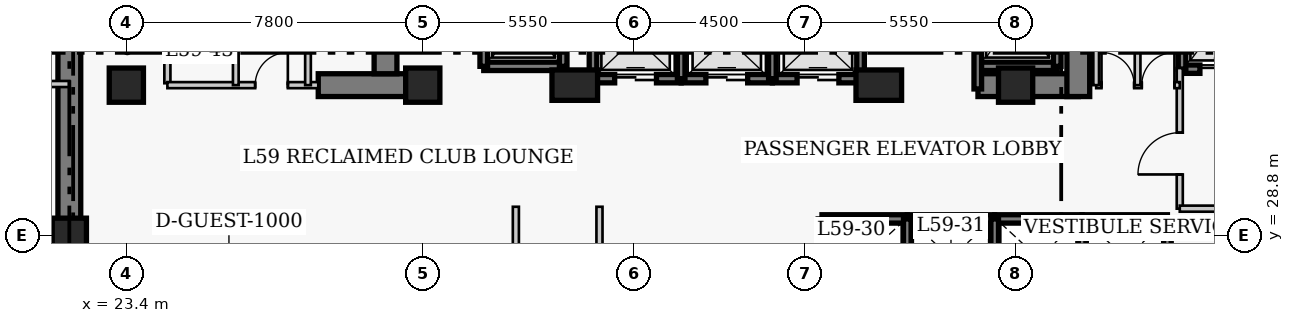
"""IFC4 building model, lengths in metres.
Left out: names, types, materials, properties, quantities, classifications, styles, units other than length and angle.
Written with IfcOpenShell. Run it as: python <this file> out.ifc"""

import sys

from ifc_helpers import new_model, si_unit, direction, frame, frame_2d, origin, origin_2d, place, context, subcontext, project, spatial, rectangle, extrude, element, fill, save


model = new_model("IFC4")
c1 = context("Model", 3, precision=1e-05, world=origin(), true_north=direction((0.0, 1.0)))
c2 = subcontext(c1, "Body", "Model", "MODEL_VIEW")
j1 = project(units=[si_unit("LENGTHUNIT", "METRE"), si_unit("PLANEANGLEUNIT", "RADIAN")], contexts=[c1])
p1 = place(None, origin())
s1 = spatial("IfcSite", under=j1, at=p1, CompositionType="ELEMENT")
p2 = place(p1, origin())
s2 = spatial("IfcBuilding", under=s1, at=p2, CompositionType="ELEMENT")
p3 = place(p2, frame((0.0, 0.0, 236.5)))
s3 = spatial("IfcBuildingStorey", under=s2, at=p3, CompositionType="ELEMENT", Elevation=236.5)
p4 = place(p3, frame((21.9, 27.05, 0.0), z_axis=(0.0, 0.0, 1.0), x_axis=(0.0, 1.0, 0.0)))
e1 = element("IfcWall", 1, at=p4, inside=s3, PredefinedType="SHEAR", context=c2, shape_type="SweptSolid", body=[
    extrude(rectangle(XDim=13.57, YDim=0.6, at=frame_2d((6.785, 0.0))), origin(), (0.0, 0.0, 1.0), 3.9),
])
p5 = place(p3, frame((28.45, 32.75, 0.0), z_axis=(0.0, 0.0, 1.0), x_axis=(1.0, 0.0, 0.0)))
e2 = element("IfcWall", 2, at=p5, inside=s3, PredefinedType="SHEAR", context=c2, shape_type="SweptSolid", body=[
    extrude(rectangle(XDim=2.4, YDim=0.6, at=frame_2d((1.2, 0.0))), origin(), (0.0, 0.0, 1.0), 3.9),
])
p6 = place(p3, frame((45.81, 32.75, 0.0), z_axis=(0.0, 0.0, 1.0), x_axis=(1.0, 0.0, 0.0)))
e3 = element("IfcWall", 3, at=p6, inside=s3, PredefinedType="SHEAR", context=c2, shape_type="SweptSolid", body=[
    extrude(rectangle(XDim=2.64, YDim=0.6, at=frame_2d((1.32, 0.0))), origin(), (0.0, 0.0, 1.0), 3.9),
])
p7 = place(p3, frame((30.22, 33.05, 0.0), z_axis=(0.0, 0.0, 1.0), x_axis=(0.0, 1.0, 0.0)))
e4 = element("IfcWall", 4, at=p7, inside=s3, PredefinedType="SHEAR", context=c2, shape_type="SweptSolid", body=[
    extrude(rectangle(XDim=7.27, YDim=0.6, at=frame_2d((3.635, 0.0))), origin(), (0.0, 0.0, 1.0), 3.9),
])
p8 = place(p3, frame((48.45, 32.45, 0.0), z_axis=(0.0, 0.0, 1.0), x_axis=(0.0, 1.0, 0.0)))
e5 = element("IfcWall", 5, at=p8, inside=s3, PredefinedType="SHEAR", context=c2, shape_type="SweptSolid", body=[
    extrude(rectangle(XDim=7.87, YDim=0.6, at=frame_2d((3.935, 0.0))), origin(), (0.0, 0.0, 1.0), 3.9),
])
p9 = place(p8, frame((5.75, 0.0, 0.0)))
e6 = element("IfcOpeningElement", 6, at=p9, cuts=e5, PredefinedType="OPENING", context=c2, shape_type="SweptSolid", body=[
    extrude(rectangle(XDim=1.1, YDim=2.15, at=frame_2d((0.55, 1.075))), frame((0.0, 0.31, 0.0), z_axis=(0.0, -1.0, 0.0), x_axis=(1.0, 0.0, 0.0)), (0.0, 0.0, 1.0), 0.62),
])
for number, where, z_axis, x_axis in (
    (7, (21.9, 28.8, 0.0), (0.0, 0.0, 1.0), (1.0, 0.0, 0.0)),
    (8, (23.4, 32.75, 0.0), (0.0, 0.0, 1.0), (1.0, 0.0, 0.0)),
    (9, (31.2, 32.75, 0.0), (0.0, 0.0, 1.0), (1.0, 0.0, 0.0)),
):
    element("IfcColumn", number, at=place(p3, frame(where, z_axis=z_axis, x_axis=x_axis)), inside=s3, PredefinedType="COLUMN", context=c2, shape_type="SweptSolid", body=[
        extrude(rectangle(XDim=0.9, YDim=0.9, at=origin_2d()), origin(), (0.0, 0.0, 1.0), 3.9),
    ])
for number, where, z_axis, x_axis in (
    (10, (35.2, 32.75, 0.0), (0.0, 0.0, 1.0), (1.0, 0.0, 0.0)),
    (11, (43.2, 32.75, 0.0), (0.0, 0.0, 1.0), (1.0, 0.0, 0.0)),
):
    element("IfcColumn", number, at=place(p3, frame(where, z_axis=z_axis, x_axis=x_axis)), inside=s3, PredefinedType="COLUMN", context=c2, shape_type="SweptSolid", body=[
        extrude(rectangle(XDim=1.2, YDim=0.8, at=origin_2d()), origin(), (0.0, 0.0, 1.0), 3.9),
    ])
p10 = place(p3, frame((46.8, 32.75, 0.0), z_axis=(0.0, 0.0, 1.0), x_axis=(1.0, 0.0, 0.0)))
e12 = element("IfcColumn", 12, at=p10, inside=s3, PredefinedType="COLUMN", context=c2, shape_type="SweptSolid", body=[
    extrude(rectangle(XDim=0.9, YDim=0.9, at=origin_2d()), origin(), (0.0, 0.0, 1.0), 3.9),
])
p11 = place(p3, frame((41.705, 29.23, 0.0), z_axis=(0.0, 0.0, 1.0), x_axis=(1.0, 0.0, 0.0)))
e13 = element("IfcWall", 13, at=p11, inside=s3, PredefinedType="SHEAR", context=c2, shape_type="SweptSolid", body=[
    extrude(rectangle(XDim=2.245, YDim=0.22, at=frame_2d((1.123, 0.0))), origin(), (0.0, 0.0, 1.0), 3.9),
])
p12 = place(p3, frame((41.705, 27.17, 0.0), z_axis=(0.0, 0.0, 1.0), x_axis=(0.0, 1.0, 0.0)))
e14 = element("IfcWall", 14, at=p12, inside=s3, PredefinedType="SHEAR", context=c2, shape_type="SweptSolid", body=[
    extrude(rectangle(XDim=2.06, YDim=0.2, at=frame_2d((1.03, 0.0))), origin(), (0.0, 0.0, 1.0), 3.9),
])
p13 = place(p3, frame((43.95, 29.23, 0.0), z_axis=(0.0, 0.0, 1.0), x_axis=(1.0, 0.0, 0.0)))
e15 = element("IfcWall", 15, at=p13, inside=s3, PredefinedType="SHEAR", context=c2, shape_type="SweptSolid", body=[
    extrude(rectangle(XDim=2.3, YDim=0.22, at=frame_2d((1.15, 0.0))), origin(), (0.0, 0.0, 1.0), 3.9),
])
p14 = place(p3, frame((43.95, 27.17, 0.0), z_axis=(0.0, 0.0, 1.0), x_axis=(0.0, 1.0, 0.0)))
e16 = element("IfcWall", 16, at=p14, inside=s3, PredefinedType="SHEAR", context=c2, shape_type="SweptSolid", body=[
    extrude(rectangle(XDim=2.06, YDim=0.2, at=frame_2d((1.03, 0.0))), origin(), (0.0, 0.0, 1.0), 3.9),
])
p15 = place(p3, frame((46.25, 29.23, 0.0), z_axis=(0.0, 0.0, 1.0), x_axis=(1.0, 0.0, 0.0)))
e17 = element("IfcWall", 17, at=p15, inside=s3, PredefinedType="SHEAR", context=c2, shape_type="SweptSolid", body=[
    extrude(rectangle(XDim=2.3, YDim=0.22, at=frame_2d((1.15, 0.0))), origin(), (0.0, 0.0, 1.0), 3.9),
])
p16 = place(p3, frame((46.25, 27.17, 0.0), z_axis=(0.0, 0.0, 1.0), x_axis=(0.0, 1.0, 0.0)))
e18 = element("IfcWall", 18, at=p16, inside=s3, PredefinedType="SHEAR", context=c2, shape_type="SweptSolid", body=[
    extrude(rectangle(XDim=2.06, YDim=0.2, at=frame_2d((1.03, 0.0))), origin(), (0.0, 0.0, 1.0), 3.9),
])
p17 = place(p3, frame((48.55, 29.23, 0.0), z_axis=(0.0, 0.0, 1.0), x_axis=(1.0, 0.0, 0.0)))
e19 = element("IfcWall", 19, at=p17, inside=s3, PredefinedType="SHEAR", context=c2, shape_type="SweptSolid", body=[
    extrude(rectangle(XDim=2.245, YDim=0.22, at=frame_2d((1.123, 0.0))), origin(), (0.0, 0.0, 1.0), 3.9),
])
for number, where, z_axis, x_axis in (
    (20, (48.55, 27.17, 0.0), (0.0, 0.0, 1.0), (0.0, 1.0, 0.0)),
    (21, (50.795, 27.17, 0.0), (0.0, 0.0, 1.0), (0.0, 1.0, 0.0)),
):
    element("IfcWall", number, at=place(p3, frame(where, z_axis=z_axis, x_axis=x_axis)), inside=s3, PredefinedType="SHEAR", context=c2, shape_type="SweptSolid", body=[
        extrude(rectangle(XDim=2.06, YDim=0.2, at=frame_2d((1.03, 0.0))), origin(), (0.0, 0.0, 1.0), 3.9),
    ])
p18 = place(p3, frame((35.68, 32.92, 0.0), z_axis=(0.0, 0.0, 1.0), x_axis=(1.0, 0.0, 0.0)))
e22 = element("IfcWall", 22, at=p18, inside=s3, PredefinedType="SHEAR", context=c2, shape_type="SweptSolid", body=[
    extrude(rectangle(XDim=2.32, YDim=0.22, at=frame_2d((1.16, 0.0))), origin(), (0.0, 0.0, 1.0), 3.9),
])
p19 = place(p18, frame((0.57, 0.0, 0.0)))
e23 = element("IfcOpeningElement", 23, at=p19, cuts=e22, PredefinedType="OPENING", context=c2, shape_type="SweptSolid", body=[
    extrude(rectangle(XDim=1.1, YDim=2.15, at=frame_2d((0.55, 1.075))), frame((0.0, 0.12, 0.0), z_axis=(0.0, -1.0, 0.0), x_axis=(1.0, 0.0, 0.0)), (0.0, 0.0, 1.0), 0.24),
])
p20 = place(p3, frame((35.68, 32.92, 0.0), z_axis=(0.0, 0.0, 1.0), x_axis=(0.0, 1.0, 0.0)))
e24 = element("IfcWall", 24, at=p20, inside=s3, PredefinedType="SHEAR", context=c2, shape_type="SweptSolid", body=[
    extrude(rectangle(XDim=2.16, YDim=0.2, at=frame_2d((1.08, 0.0))), origin(), (0.0, 0.0, 1.0), 3.9),
])
p21 = place(p3, frame((38.0, 32.92, 0.0), z_axis=(0.0, 0.0, 1.0), x_axis=(1.0, 0.0, 0.0)))
e25 = element("IfcWall", 25, at=p21, inside=s3, PredefinedType="SHEAR", context=c2, shape_type="SweptSolid", body=[
    extrude(rectangle(XDim=2.4, YDim=0.22, at=frame_2d((1.2, 0.0))), origin(), (0.0, 0.0, 1.0), 3.9),
])
p22 = place(p21, frame((0.65, 0.0, 0.0)))
e26 = element("IfcOpeningElement", 26, at=p22, cuts=e25, PredefinedType="OPENING", context=c2, shape_type="SweptSolid", body=[
    extrude(rectangle(XDim=1.1, YDim=2.15, at=frame_2d((0.55, 1.075))), frame((0.0, 0.12, 0.0), z_axis=(0.0, -1.0, 0.0), x_axis=(1.0, 0.0, 0.0)), (0.0, 0.0, 1.0), 0.24),
])
p23 = place(p3, frame((38.0, 32.92, 0.0), z_axis=(0.0, 0.0, 1.0), x_axis=(0.0, 1.0, 0.0)))
e27 = element("IfcWall", 27, at=p23, inside=s3, PredefinedType="SHEAR", context=c2, shape_type="SweptSolid", body=[
    extrude(rectangle(XDim=2.16, YDim=0.2, at=frame_2d((1.08, 0.0))), origin(), (0.0, 0.0, 1.0), 3.9),
])
p24 = place(p3, frame((40.4, 32.92, 0.0), z_axis=(0.0, 0.0, 1.0), x_axis=(1.0, 0.0, 0.0)))
e28 = element("IfcWall", 28, at=p24, inside=s3, PredefinedType="SHEAR", context=c2, shape_type="SweptSolid", body=[
    extrude(rectangle(XDim=2.32, YDim=0.22, at=frame_2d((1.16, 0.0))), origin(), (0.0, 0.0, 1.0), 3.9),
])
p25 = place(p24, frame((0.65, 0.0, 0.0)))
e29 = element("IfcOpeningElement", 29, at=p25, cuts=e28, PredefinedType="OPENING", context=c2, shape_type="SweptSolid", body=[
    extrude(rectangle(XDim=1.1, YDim=2.15, at=frame_2d((0.55, 1.075))), frame((0.0, 0.12, 0.0), z_axis=(0.0, -1.0, 0.0), x_axis=(1.0, 0.0, 0.0)), (0.0, 0.0, 1.0), 0.24),
])
for number, where, z_axis, x_axis in (
    (30, (40.4, 32.92, 0.0), (0.0, 0.0, 1.0), (0.0, 1.0, 0.0)),
    (31, (42.72, 32.92, 0.0), (0.0, 0.0, 1.0), (0.0, 1.0, 0.0)),
):
    element("IfcWall", number, at=place(p3, frame(where, z_axis=z_axis, x_axis=x_axis)), inside=s3, PredefinedType="SHEAR", context=c2, shape_type="SweptSolid", body=[
        extrude(rectangle(XDim=2.16, YDim=0.2, at=frame_2d((1.08, 0.0))), origin(), (0.0, 0.0, 1.0), 3.9),
    ])
p26 = place(p3, frame((51.18, 33.17, 0.0), z_axis=(0.0, 0.0, 1.0), x_axis=(1.0, 0.0, 0.0)))
e32 = element("IfcWall", 32, at=p26, inside=s3, PredefinedType="SHEAR", context=c2, shape_type="SweptSolid", body=[
    extrude(rectangle(XDim=2.42, YDim=0.22, at=frame_2d((1.21, 0.0))), origin(), (0.0, 0.0, 1.0), 3.9),
])
p27 = place(p26, frame((0.47, 0.0, 0.0)))
e33 = element("IfcOpeningElement", 33, at=p27, cuts=e32, PredefinedType="OPENING", context=c2, shape_type="SweptSolid", body=[
    extrude(rectangle(XDim=1.3, YDim=2.15, at=frame_2d((0.65, 1.075))), frame((0.0, 0.12, 0.0), z_axis=(0.0, -1.0, 0.0), x_axis=(1.0, 0.0, 0.0)), (0.0, 0.0, 1.0), 0.24),
])
p28 = place(p3, frame((51.18, 33.17, 0.0), z_axis=(0.0, 0.0, 1.0), x_axis=(0.0, 1.0, 0.0)))
e34 = element("IfcWall", 34, at=p28, inside=s3, PredefinedType="SHEAR", context=c2, shape_type="SweptSolid", body=[
    extrude(rectangle(XDim=2.86, YDim=0.2, at=frame_2d((1.43, 0.0))), origin(), (0.0, 0.0, 1.0), 3.9),
])
p29 = place(p3, frame((32.805, 33.245, 0.0), z_axis=(0.0, 0.0, 1.0), x_axis=(1.0, 0.0, 0.0)))
e35 = element("IfcWall", 35, at=p29, inside=s3, PredefinedType="SHEAR", context=c2, shape_type="SweptSolid", body=[
    extrude(rectangle(XDim=2.09, YDim=0.22, at=frame_2d((1.045, 0.0))), origin(), (0.0, 0.0, 1.0), 3.9),
])
for number, where, z_axis, x_axis in (
    (36, (32.805, 33.245, 0.0), (0.0, 0.0, 1.0), (0.0, 1.0, 0.0)),
    (37, (34.895, 33.245, 0.0), (0.0, 0.0, 1.0), (0.0, 1.0, 0.0)),
):
    element("IfcWall", number, at=place(p3, frame(where, z_axis=z_axis, x_axis=x_axis)), inside=s3, PredefinedType="SHEAR", context=c2, shape_type="SweptSolid", body=[
        extrude(rectangle(XDim=2.91, YDim=0.2, at=frame_2d((1.455, 0.0))), origin(), (0.0, 0.0, 1.0), 3.9),
    ])
p30 = place(p3, frame((45.805, 33.245, 0.0), z_axis=(0.0, 0.0, 1.0), x_axis=(1.0, 0.0, 0.0)))
e38 = element("IfcWall", 38, at=p30, inside=s3, PredefinedType="SHEAR", context=c2, shape_type="SweptSolid", body=[
    extrude(rectangle(XDim=2.09, YDim=0.22, at=frame_2d((1.045, 0.0))), origin(), (0.0, 0.0, 1.0), 3.9),
])
p31 = place(p3, frame((45.805, 32.65, 0.0), z_axis=(0.0, 0.0, 1.0), x_axis=(0.0, 1.0, 0.0)))
e39 = element("IfcWall", 39, at=p31, inside=s3, PredefinedType="SHEAR", context=c2, shape_type="SweptSolid", body=[
    extrude(rectangle(XDim=3.505, YDim=0.2, at=frame_2d((1.752, 0.0))), origin(), (0.0, 0.0, 1.0), 3.9),
])
p32 = place(p3, frame((47.895, 33.245, 0.0), z_axis=(0.0, 0.0, 1.0), x_axis=(0.0, 1.0, 0.0)))
e40 = element("IfcWall", 40, at=p32, inside=s3, PredefinedType="SHEAR", context=c2, shape_type="SweptSolid", body=[
    extrude(rectangle(XDim=2.91, YDim=0.2, at=frame_2d((1.455, 0.0))), origin(), (0.0, 0.0, 1.0), 3.9),
])
p33 = place(p3, frame((24.48, 32.8, 0.0), z_axis=(0.0, 0.0, 1.0), x_axis=(0.0, 1.0, 0.0)))
e41 = element("IfcWall", 41, at=p33, inside=s3, PredefinedType="PARTITIONING", context=c2, shape_type="SweptSolid", body=[
    extrude(rectangle(XDim=3.57, YDim=0.16, at=frame_2d((1.785, 0.0))), origin(), (0.0, 0.0, 1.0), 3.52),
])
p34 = place(p33, frame((1.604, 0.0, 0.0)))
e42 = element("IfcOpeningElement", 42, at=p34, cuts=e41, PredefinedType="OPENING", context=c2, shape_type="SweptSolid", body=[
    extrude(rectangle(XDim=0.9, YDim=2.1, at=frame_2d((0.45, 1.05))), frame((0.0, 0.09, 0.0), z_axis=(0.0, -1.0, 0.0), x_axis=(1.0, 0.0, 0.0)), (0.0, 0.0, 1.0), 0.18),
])
p35 = place(p3, frame((51.12, 29.5, 0.0), z_axis=(0.0, 0.0, 1.0), x_axis=(0.0, 1.0, 0.0)))
e43 = element("IfcWall", 43, at=p35, inside=s3, PredefinedType="PARTITIONING", context=c2, shape_type="SweptSolid", body=[
    extrude(rectangle(XDim=3.7, YDim=0.16, at=frame_2d((1.85, 0.0))), origin(), (0.0, 0.0, 1.0), 3.52),
])
p36 = place(p35, frame((0.9, 0.0, 0.0)))
e44 = element("IfcOpeningElement", 44, at=p36, cuts=e43, PredefinedType="OPENING", context=c2, shape_type="SweptSolid", body=[
    extrude(rectangle(XDim=1.1, YDim=2.15, at=frame_2d((0.55, 1.075))), frame((0.0, 0.09, 0.0), z_axis=(0.0, -1.0, 0.0), x_axis=(1.0, 0.0, 0.0)), (0.0, 0.0, 1.0), 0.18),
])
p37 = place(p3, frame((51.12, 29.5, 0.0), z_axis=(0.0, 0.0, 1.0), x_axis=(1.0, 0.0, 0.0)))
e45 = element("IfcWall", 45, at=p37, inside=s3, PredefinedType="PARTITIONING", context=c2, shape_type="SweptSolid", body=[
    extrude(rectangle(XDim=5.63, YDim=0.16, at=frame_2d((2.815, 0.0))), origin(), (0.0, 0.0, 1.0), 3.52),
])
p38 = place(p3, frame((24.48, 32.75, 0.0), z_axis=(0.0, 0.0, 1.0), x_axis=(1.0, 0.0, 0.0)))
e46 = element("IfcWall", 46, at=p38, inside=s3, PredefinedType="PARTITIONING", context=c2, shape_type="SweptSolid", body=[
    extrude(rectangle(XDim=3.97, YDim=0.16, at=frame_2d((1.985, 0.0))), origin(), (0.0, 0.0, 1.0), 3.52),
])
p39 = place(p38, frame((2.31, 0.0, 0.0)))
e47 = element("IfcOpeningElement", 47, at=p39, cuts=e46, PredefinedType="OPENING", context=c2, shape_type="SweptSolid", body=[
    extrude(rectangle(XDim=0.86, YDim=2.05, at=frame_2d((0.43, 1.025))), frame((0.0, 0.09, 0.0), z_axis=(0.0, -1.0, 0.0), x_axis=(1.0, 0.0, 0.0)), (0.0, 0.0, 1.0), 0.18),
])
p40 = place(p3, frame((48.92, 32.75, 0.0), z_axis=(0.0, 0.0, 1.0), x_axis=(1.0, 0.0, 0.0)))
e48 = element("IfcWall", 48, at=p40, inside=s3, PredefinedType="PARTITIONING", context=c2, shape_type="SweptSolid", body=[
    extrude(rectangle(XDim=2.2, YDim=0.16, at=frame_2d((1.1, 0.0))), origin(), (0.0, 0.0, 1.0), 3.52),
])
p41 = place(p40, frame((0.14, 0.0, 0.0)))
e49 = element("IfcOpeningElement", 49, at=p41, cuts=e48, PredefinedType="OPENING", context=c2, shape_type="SweptSolid", body=[
    extrude(rectangle(XDim=0.86, YDim=2.05, at=frame_2d((0.43, 1.025))), frame((0.0, 0.09, 0.0), z_axis=(0.0, -1.0, 0.0), x_axis=(1.0, 0.0, 0.0)), (0.0, 0.0, 1.0), 0.18),
])
p42 = place(p40, frame((1.2, 0.0, 0.0)))
e50 = element("IfcOpeningElement", 50, at=p42, cuts=e48, PredefinedType="OPENING", context=c2, shape_type="SweptSolid", body=[
    extrude(rectangle(XDim=0.86, YDim=2.05, at=frame_2d((0.43, 1.025))), frame((0.0, 0.09, 0.0), z_axis=(0.0, -1.0, 0.0), x_axis=(1.0, 0.0, 0.0)), (0.0, 0.0, 1.0), 0.18),
])
for number, where, z_axis, x_axis in (
    (51, (48.92, 32.75, 0.0), (0.0, 0.0, 1.0), (0.0, 1.0, 0.0)),
    (52, (26.28, 32.75, 0.0), (0.0, 0.0, 1.0), (0.0, 1.0, 0.0)),
    (53, (28.18, 32.75, 0.0), (0.0, 0.0, 1.0), (0.0, 1.0, 0.0)),
    (54, (50.01, 32.75, 0.0), (0.0, 0.0, 1.0), (0.0, 1.0, 0.0)),
):
    element("IfcWall", number, at=place(p3, frame(where, z_axis=z_axis, x_axis=x_axis)), inside=s3, PredefinedType="PARTITIONING", context=c2, shape_type="SweptSolid", body=[
        extrude(rectangle(XDim=3.62, YDim=0.15, at=frame_2d((1.81, 0.0))), origin(), (0.0, 0.0, 1.0), 3.52),
    ])
for number, where, z_axis, x_axis in (
    (55, (33.65, 27.26, 0.0), (0.0, 0.0, 1.0), (0.0, 1.0, 0.0)),
    (56, (35.85, 27.26, 0.0), (0.0, 0.0, 1.0), (0.0, 1.0, 0.0)),
):
    element("IfcWall", number, at=place(p3, frame(where, z_axis=z_axis, x_axis=x_axis)), inside=s3, PredefinedType="PARTITIONING", context=c2, shape_type="SweptSolid", body=[
        extrude(rectangle(XDim=2.29, YDim=0.16, at=frame_2d((1.145, 0.0))), origin(), (0.0, 0.0, 1.0), 3.52),
    ])
p43 = place(p3, frame((19.41, 32.78, 0.0), z_axis=(0.0, 0.0, 1.0), x_axis=(1.0, 0.0, 0.0)))
e57 = element("IfcWall", 57, at=p43, inside=s3, PredefinedType="PARTITIONING", context=c2, shape_type="SweptSolid", body=[
    extrude(rectangle(XDim=2.49, YDim=0.16, at=frame_2d((1.245, 0.0))), origin(), (0.0, 0.0, 1.0), 3.52),
])
p44 = place(p19, origin())
e58 = element("IfcDoor", 58, at=p44, inside=s3, OperationType="DOUBLE_DOOR_SLIDING", PredefinedType="DOOR", context=c2, shape_type="SweptSolid", body=[
    extrude(rectangle(XDim=1.1, YDim=2.15, at=frame_2d((0.55, 1.075))), frame((0.0, 0.025, 0.0), z_axis=(0.0, -1.0, 0.0), x_axis=(1.0, 0.0, 0.0)), (0.0, 0.0, 1.0), 0.05),
])
fill(e23, e58)
p45 = place(p22, origin())
e59 = element("IfcDoor", 59, at=p45, inside=s3, OperationType="DOUBLE_DOOR_SLIDING", PredefinedType="DOOR", context=c2, shape_type="SweptSolid", body=[
    extrude(rectangle(XDim=1.1, YDim=2.15, at=frame_2d((0.55, 1.075))), frame((0.0, 0.025, 0.0), z_axis=(0.0, -1.0, 0.0), x_axis=(1.0, 0.0, 0.0)), (0.0, 0.0, 1.0), 0.05),
])
fill(e26, e59)
p46 = place(p25, origin())
e60 = element("IfcDoor", 60, at=p46, inside=s3, OperationType="DOUBLE_DOOR_SLIDING", PredefinedType="DOOR", context=c2, shape_type="SweptSolid", body=[
    extrude(rectangle(XDim=1.1, YDim=2.15, at=frame_2d((0.55, 1.075))), frame((0.0, 0.025, 0.0), z_axis=(0.0, -1.0, 0.0), x_axis=(1.0, 0.0, 0.0)), (0.0, 0.0, 1.0), 0.05),
])
fill(e29, e60)
p47 = place(p27, origin())
e61 = element("IfcDoor", 61, at=p47, inside=s3, OperationType="DOUBLE_DOOR_SLIDING", PredefinedType="DOOR", context=c2, shape_type="SweptSolid", body=[
    extrude(rectangle(XDim=1.3, YDim=2.15, at=frame_2d((0.65, 1.075))), frame((0.0, 0.025, 0.0), z_axis=(0.0, -1.0, 0.0), x_axis=(1.0, 0.0, 0.0)), (0.0, 0.0, 1.0), 0.05),
])
fill(e33, e61)
p48 = place(p36, origin())
e62 = element("IfcDoor", 62, at=p48, inside=s3, OperationType="SINGLE_SWING_LEFT", PredefinedType="DOOR", context=c2, shape_type="SweptSolid", body=[
    extrude(rectangle(XDim=1.1, YDim=2.15, at=frame_2d((0.55, 1.075))), frame((0.0, 0.025, 0.0), z_axis=(0.0, -1.0, 0.0), x_axis=(1.0, 0.0, 0.0)), (0.0, 0.0, 1.0), 0.05),
])
fill(e44, e62)
p49 = place(p39, origin())
e63 = element("IfcDoor", 63, at=p49, inside=s3, OperationType="SINGLE_SWING_RIGHT", PredefinedType="DOOR", context=c2, shape_type="SweptSolid", body=[
    extrude(rectangle(XDim=0.86, YDim=2.05, at=frame_2d((0.43, 1.025))), frame((0.0, 0.025, 0.0), z_axis=(0.0, -1.0, 0.0), x_axis=(1.0, 0.0, 0.0)), (0.0, 0.0, 1.0), 0.05),
])
fill(e47, e63)
p50 = place(p41, origin())
e64 = element("IfcDoor", 64, at=p50, inside=s3, OperationType="SINGLE_SWING_LEFT", PredefinedType="DOOR", context=c2, shape_type="SweptSolid", body=[
    extrude(rectangle(XDim=0.86, YDim=2.05, at=frame_2d((0.43, 1.025))), frame((0.0, 0.025, 0.0), z_axis=(0.0, -1.0, 0.0), x_axis=(1.0, 0.0, 0.0)), (0.0, 0.0, 1.0), 0.05),
])
fill(e49, e64)
p51 = place(p42, origin())
e65 = element("IfcDoor", 65, at=p51, inside=s3, OperationType="SINGLE_SWING_RIGHT", PredefinedType="DOOR", context=c2, shape_type="SweptSolid", body=[
    extrude(rectangle(XDim=0.86, YDim=2.05, at=frame_2d((0.43, 1.025))), frame((0.0, 0.025, 0.0), z_axis=(0.0, -1.0, 0.0), x_axis=(1.0, 0.0, 0.0)), (0.0, 0.0, 1.0), 0.05),
])
fill(e50, e65)
save(model, sys.argv[1])
